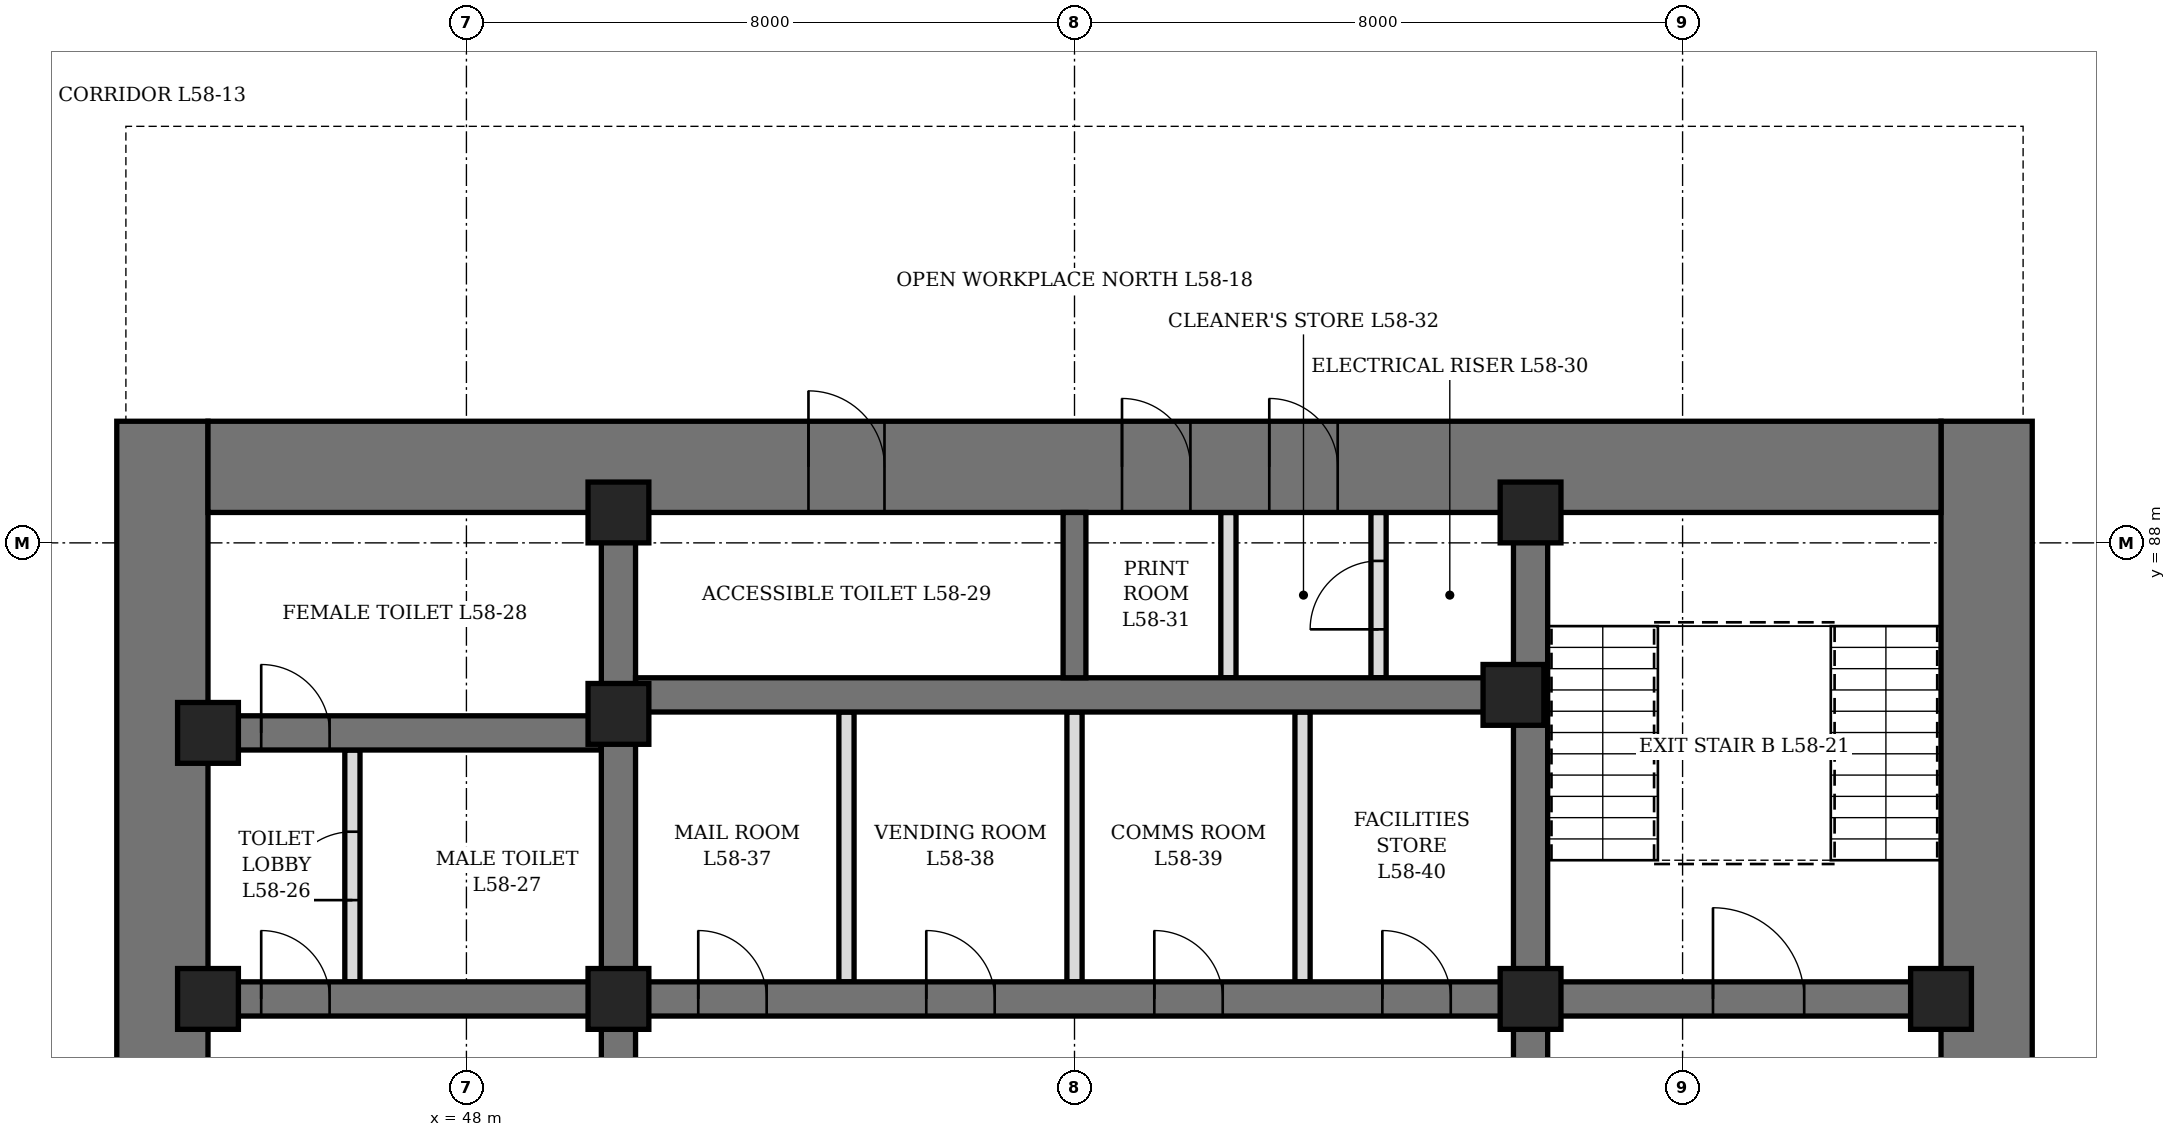
"""IFC4 building model, lengths in metres.
Left out: names, types, materials, properties, quantities, classifications, styles, units other than length and angle.
Written with IfcOpenShell. Run it as: python <this file> out.ifc"""

import sys

from ifc_helpers import new_model, si_unit, direction, frame, frame_2d, origin, origin_2d, place, context, subcontext, project, spatial, rectangle, hollow_rectangle, extrude, element, fill, save


model = new_model("IFC4")
c1 = context("Model", 3, precision=1e-05, world=origin(), true_north=direction((0.0, 1.0)))
c2 = subcontext(c1, "Body", "Model", "MODEL_VIEW")
j1 = project(units=[si_unit("LENGTHUNIT", "METRE"), si_unit("PLANEANGLEUNIT", "RADIAN")], contexts=[c1])
p1 = place(None, origin())
s1 = spatial("IfcSite", under=j1, at=p1, CompositionType="ELEMENT")
p2 = place(p1, origin())
s2 = spatial("IfcBuilding", under=s1, at=p2, CompositionType="ELEMENT")
p3 = place(p2, frame((0.0, 0.0, 258.7)))
s3 = spatial("IfcBuildingStorey", under=s2, at=p3, CompositionType="ELEMENT", Elevation=258.7)
p4 = place(p3, frame((44.0, 70.4, 0.0), z_axis=(0.0, 0.0, 1.0), x_axis=(0.0, 1.0, 0.0)))
e1 = element("IfcWall", 1, at=p4, inside=s3, PredefinedType="SHEAR", context=c2, shape_type="SweptSolid", body=[
    extrude(rectangle(XDim=19.2, YDim=1.2, at=frame_2d((9.6, 0.0))), origin(), (0.0, 0.0, 1.0), 4.2),
])
p5 = place(p4, frame((8.6, 0.0, 0.0)))
e2 = element("IfcOpeningElement", 2, at=p5, cuts=e1, PredefinedType="OPENING", context=c2, shape_type="SweptSolid", body=[
    extrude(rectangle(XDim=2.0, YDim=2.4, at=frame_2d((1.0, 1.2))), frame((0.0, 0.61, 0.0), z_axis=(0.0, -1.0, 0.0), x_axis=(1.0, 0.0, 0.0)), (0.0, 0.0, 1.0), 1.22),
])
p6 = place(p3, frame((68.0, 70.4, 0.0), z_axis=(0.0, 0.0, 1.0), x_axis=(0.0, 1.0, 0.0)))
e3 = element("IfcWall", 3, at=p6, inside=s3, PredefinedType="SHEAR", context=c2, shape_type="SweptSolid", body=[
    extrude(rectangle(XDim=19.2, YDim=1.2, at=frame_2d((9.6, 0.0))), origin(), (0.0, 0.0, 1.0), 4.2),
])
p7 = place(p6, frame((8.6, 0.0, 0.0)))
e4 = element("IfcOpeningElement", 4, at=p7, cuts=e3, PredefinedType="OPENING", context=c2, shape_type="SweptSolid", body=[
    extrude(rectangle(XDim=2.0, YDim=2.4, at=frame_2d((1.0, 1.2))), frame((0.0, 0.61, 0.0), z_axis=(0.0, -1.0, 0.0), x_axis=(1.0, 0.0, 0.0)), (0.0, 0.0, 1.0), 1.22),
])
p8 = place(p3, frame((44.6, 89.0, 0.0), z_axis=(0.0, 0.0, 1.0), x_axis=(1.0, 0.0, 0.0)))
e5 = element("IfcWall", 5, at=p8, inside=s3, PredefinedType="SHEAR", context=c2, shape_type="SweptSolid", body=[
    extrude(rectangle(XDim=22.8, YDim=1.2, at=frame_2d((11.4, 0.0))), origin(), (0.0, 0.0, 1.0), 4.2),
])
p9 = place(p8, frame((7.9, 0.0, 0.0)))
e6 = element("IfcOpeningElement", 6, at=p9, cuts=e5, PredefinedType="OPENING", context=c2, shape_type="SweptSolid", body=[
    extrude(rectangle(XDim=1.0, YDim=2.1, at=frame_2d((0.5, 1.05))), frame((0.0, 0.61, 0.0), z_axis=(0.0, -1.0, 0.0), x_axis=(1.0, 0.0, 0.0)), (0.0, 0.0, 1.0), 1.22),
])
p10 = place(p8, frame((12.025, 0.0, 0.0)))
e7 = element("IfcOpeningElement", 7, at=p10, cuts=e5, PredefinedType="OPENING", context=c2, shape_type="SweptSolid", body=[
    extrude(rectangle(XDim=0.9, YDim=2.1, at=frame_2d((0.45, 1.05))), frame((0.0, 0.61, 0.0), z_axis=(0.0, -1.0, 0.0), x_axis=(1.0, 0.0, 0.0)), (0.0, 0.0, 1.0), 1.22),
])
p11 = place(p8, frame((13.962, 0.0, 0.0)))
e8 = element("IfcOpeningElement", 8, at=p11, cuts=e5, PredefinedType="OPENING", context=c2, shape_type="SweptSolid", body=[
    extrude(rectangle(XDim=0.9, YDim=2.1, at=frame_2d((0.45, 1.05))), frame((0.0, 0.61, 0.0), z_axis=(0.0, -1.0, 0.0), x_axis=(1.0, 0.0, 0.0)), (0.0, 0.0, 1.0), 1.22),
])
p12 = place(p3, frame((50.0, 71.6, 0.0), z_axis=(0.0, 0.0, 1.0), x_axis=(0.0, 1.0, 0.0)))
e9 = element("IfcWall", 9, at=p12, inside=s3, PredefinedType="SHEAR", context=c2, shape_type="SweptSolid", body=[
    extrude(rectangle(XDim=16.8, YDim=0.45, at=frame_2d((8.4, 0.0))), origin(), (0.0, 0.0, 1.0), 4.2),
])
p13 = place(p12, frame((7.5, 0.0, 0.0)))
e10 = element("IfcOpeningElement", 10, at=p13, cuts=e9, PredefinedType="OPENING", context=c2, shape_type="SweptSolid", body=[
    extrude(rectangle(XDim=1.8, YDim=2.4, at=frame_2d((0.9, 1.2))), frame((0.0, 0.235, 0.0), z_axis=(0.0, -1.0, 0.0), x_axis=(1.0, 0.0, 0.0)), (0.0, 0.0, 1.0), 0.47),
])
p14 = place(p3, frame((62.0, 71.6, 0.0), z_axis=(0.0, 0.0, 1.0), x_axis=(0.0, 1.0, 0.0)))
e11 = element("IfcWall", 11, at=p14, inside=s3, PredefinedType="SHEAR", context=c2, shape_type="SweptSolid", body=[
    extrude(rectangle(XDim=16.8, YDim=0.45, at=frame_2d((8.4, 0.0))), origin(), (0.0, 0.0, 1.0), 4.2),
])
p15 = place(p14, frame((7.5, 0.0, 0.0)))
e12 = element("IfcOpeningElement", 12, at=p15, cuts=e11, PredefinedType="OPENING", context=c2, shape_type="SweptSolid", body=[
    extrude(rectangle(XDim=1.8, YDim=2.4, at=frame_2d((0.9, 1.2))), frame((0.0, 0.235, 0.0), z_axis=(0.0, -1.0, 0.0), x_axis=(1.0, 0.0, 0.0)), (0.0, 0.0, 1.0), 0.47),
])
p16 = place(p3, frame((44.6, 82.0, 0.0), z_axis=(0.0, 0.0, 1.0), x_axis=(1.0, 0.0, 0.0)))
e13 = element("IfcWall", 13, at=p16, inside=s3, PredefinedType="SHEAR", context=c2, shape_type="SweptSolid", body=[
    extrude(rectangle(XDim=5.175, YDim=0.45, at=frame_2d((2.587, 0.0))), origin(), (0.0, 0.0, 1.0), 4.2),
])
p17 = place(p16, frame((0.7, 0.0, 0.0)))
e14 = element("IfcOpeningElement", 14, at=p17, cuts=e13, PredefinedType="OPENING", context=c2, shape_type="SweptSolid", body=[
    extrude(rectangle(XDim=0.9, YDim=2.1, at=frame_2d((0.45, 1.05))), frame((0.0, 0.235, 0.0), z_axis=(0.0, -1.0, 0.0), x_axis=(1.0, 0.0, 0.0)), (0.0, 0.0, 1.0), 0.47),
])
p18 = place(p3, frame((44.6, 85.5, 0.0), z_axis=(0.0, 0.0, 1.0), x_axis=(1.0, 0.0, 0.0)))
e15 = element("IfcWall", 15, at=p18, inside=s3, PredefinedType="SHEAR", context=c2, shape_type="SweptSolid", body=[
    extrude(rectangle(XDim=5.175, YDim=0.45, at=frame_2d((2.587, 0.0))), origin(), (0.0, 0.0, 1.0), 4.2),
])
p19 = place(p18, frame((0.7, 0.0, 0.0)))
e16 = element("IfcOpeningElement", 16, at=p19, cuts=e15, PredefinedType="OPENING", context=c2, shape_type="SweptSolid", body=[
    extrude(rectangle(XDim=0.9, YDim=2.1, at=frame_2d((0.45, 1.05))), frame((0.0, 0.235, 0.0), z_axis=(0.0, -1.0, 0.0), x_axis=(1.0, 0.0, 0.0)), (0.0, 0.0, 1.0), 0.47),
])
p20 = place(p3, frame((62.225, 82.0, 0.0), z_axis=(0.0, 0.0, 1.0), x_axis=(1.0, 0.0, 0.0)))
e17 = element("IfcWall", 17, at=p20, inside=s3, PredefinedType="SHEAR", context=c2, shape_type="SweptSolid", body=[
    extrude(rectangle(XDim=5.175, YDim=0.45, at=frame_2d((2.587, 0.0))), origin(), (0.0, 0.0, 1.0), 4.2),
])
p21 = place(p20, frame((2.175, 0.0, 0.0)))
e18 = element("IfcOpeningElement", 18, at=p21, cuts=e17, PredefinedType="OPENING", context=c2, shape_type="SweptSolid", body=[
    extrude(rectangle(XDim=1.2, YDim=2.1, at=frame_2d((0.6, 1.05))), frame((0.0, 0.235, 0.0), z_axis=(0.0, -1.0, 0.0), x_axis=(1.0, 0.0, 0.0)), (0.0, 0.0, 1.0), 0.47),
])
p22 = place(p3, frame((50.225, 82.0, 0.0), z_axis=(0.0, 0.0, 1.0), x_axis=(1.0, 0.0, 0.0)))
e19 = element("IfcWall", 19, at=p22, inside=s3, PredefinedType="SHEAR", context=c2, shape_type="SweptSolid", body=[
    extrude(rectangle(XDim=11.55, YDim=0.45, at=frame_2d((5.775, 0.0))), origin(), (0.0, 0.0, 1.0), 4.2),
])
p23 = place(p22, frame((0.825, 0.0, 0.0)))
e20 = element("IfcOpeningElement", 20, at=p23, cuts=e19, PredefinedType="OPENING", context=c2, shape_type="SweptSolid", body=[
    extrude(rectangle(XDim=0.9, YDim=2.1, at=frame_2d((0.45, 1.05))), frame((0.0, 0.235, 0.0), z_axis=(0.0, -1.0, 0.0), x_axis=(1.0, 0.0, 0.0)), (0.0, 0.0, 1.0), 0.47),
])
p24 = place(p22, frame((3.825, 0.0, 0.0)))
e21 = element("IfcOpeningElement", 21, at=p24, cuts=e19, PredefinedType="OPENING", context=c2, shape_type="SweptSolid", body=[
    extrude(rectangle(XDim=0.9, YDim=2.1, at=frame_2d((0.45, 1.05))), frame((0.0, 0.235, 0.0), z_axis=(0.0, -1.0, 0.0), x_axis=(1.0, 0.0, 0.0)), (0.0, 0.0, 1.0), 0.47),
])
p25 = place(p22, frame((6.825, 0.0, 0.0)))
e22 = element("IfcOpeningElement", 22, at=p25, cuts=e19, PredefinedType="OPENING", context=c2, shape_type="SweptSolid", body=[
    extrude(rectangle(XDim=0.9, YDim=2.1, at=frame_2d((0.45, 1.05))), frame((0.0, 0.235, 0.0), z_axis=(0.0, -1.0, 0.0), x_axis=(1.0, 0.0, 0.0)), (0.0, 0.0, 1.0), 0.47),
])
p26 = place(p22, frame((9.825, 0.0, 0.0)))
e23 = element("IfcOpeningElement", 23, at=p26, cuts=e19, PredefinedType="OPENING", context=c2, shape_type="SweptSolid", body=[
    extrude(rectangle(XDim=0.9, YDim=2.1, at=frame_2d((0.45, 1.05))), frame((0.0, 0.235, 0.0), z_axis=(0.0, -1.0, 0.0), x_axis=(1.0, 0.0, 0.0)), (0.0, 0.0, 1.0), 0.47),
])
p27 = place(p3, frame((50.225, 86.0, 0.0), z_axis=(0.0, 0.0, 1.0), x_axis=(1.0, 0.0, 0.0)))
e24 = element("IfcWall", 24, at=p27, inside=s3, PredefinedType="SHEAR", context=c2, shape_type="SweptSolid", body=[
    extrude(rectangle(XDim=11.55, YDim=0.45, at=frame_2d((5.775, 0.0))), origin(), (0.0, 0.0, 1.0), 4.2),
])
p28 = place(p3, frame((56.0, 86.225, 0.0), z_axis=(0.0, 0.0, 1.0), x_axis=(0.0, 1.0, 0.0)))
e25 = element("IfcWall", 25, at=p28, inside=s3, PredefinedType="SHEAR", context=c2, shape_type="SweptSolid", body=[
    extrude(rectangle(XDim=2.175, YDim=0.3, at=frame_2d((1.087, 0.0))), origin(), (0.0, 0.0, 1.0), 4.2),
])
for number, where, z_axis, x_axis in (
    (26, (44.6, 82.0, 0.0), (0.0, 0.0, 1.0), (1.0, 0.0, 0.0)),
    (27, (44.6, 85.5, 0.0), (0.0, 0.0, 1.0), (1.0, 0.0, 0.0)),
    (28, (50.0, 82.0, 0.0), (0.0, 0.0, 1.0), (1.0, 0.0, 0.0)),
    (29, (50.0, 85.75, 0.0), (0.0, 0.0, 1.0), (1.0, 0.0, 0.0)),
    (30, (50.0, 88.4, 0.0), (0.0, 0.0, 1.0), (1.0, 0.0, 0.0)),
    (31, (61.775, 86.0, 0.0), (0.0, 0.0, 1.0), (1.0, 0.0, 0.0)),
    (32, (62.0, 82.0, 0.0), (0.0, 0.0, 1.0), (1.0, 0.0, 0.0)),
    (33, (62.0, 88.4, 0.0), (0.0, 0.0, 1.0), (1.0, 0.0, 0.0)),
    (34, (67.4, 82.0, 0.0), (0.0, 0.0, 1.0), (1.0, 0.0, 0.0)),
):
    element("IfcColumn", number, at=place(p3, frame(where, z_axis=z_axis, x_axis=x_axis)), inside=s3, PredefinedType="COLUMN", context=c2, shape_type="SweptSolid", body=[
        extrude(hollow_rectangle(XDim=0.8, YDim=0.8, WallThickness=0.1, at=origin_2d()), origin(), (0.0, 0.0, 1.0), 4.2),
    ])
p29 = place(p3, frame((46.5, 82.225, 0.0), z_axis=(0.0, 0.0, 1.0), x_axis=(0.0, 1.0, 0.0)))
e35 = element("IfcWall", 35, at=p29, inside=s3, PredefinedType="PARTITIONING", context=c2, shape_type="SweptSolid", body=[
    extrude(rectangle(XDim=3.05, YDim=0.2, at=frame_2d((1.525, 0.0))), origin(), (0.0, 0.0, 1.0), 4.04),
])
p30 = place(p29, frame((1.075, 0.0, 0.0)))
e36 = element("IfcOpeningElement", 36, at=p30, cuts=e35, PredefinedType="OPENING", context=c2, shape_type="SweptSolid", body=[
    extrude(rectangle(XDim=0.9, YDim=2.1, at=frame_2d((0.45, 1.05))), frame((0.0, 0.11, 0.0), z_axis=(0.0, -1.0, 0.0), x_axis=(1.0, 0.0, 0.0)), (0.0, 0.0, 1.0), 0.22),
])
p31 = place(p3, frame((60.0, 86.225, 0.0), z_axis=(0.0, 0.0, 1.0), x_axis=(0.0, 1.0, 0.0)))
e37 = element("IfcWall", 37, at=p31, inside=s3, PredefinedType="PARTITIONING", context=c2, shape_type="SweptSolid", body=[
    extrude(rectangle(XDim=2.175, YDim=0.2, at=frame_2d((1.087, 0.0))), origin(), (0.0, 0.0, 1.0), 4.04),
])
p32 = place(p31, frame((0.637, 0.0, 0.0)))
e38 = element("IfcOpeningElement", 38, at=p32, cuts=e37, PredefinedType="OPENING", context=c2, shape_type="SweptSolid", body=[
    extrude(rectangle(XDim=0.9, YDim=2.1, at=frame_2d((0.45, 1.05))), frame((0.0, 0.11, 0.0), z_axis=(0.0, -1.0, 0.0), x_axis=(1.0, 0.0, 0.0)), (0.0, 0.0, 1.0), 0.22),
])
p33 = place(p3, frame((58.025, 86.225, 0.0), z_axis=(0.0, 0.0, 1.0), x_axis=(0.0, 1.0, 0.0)))
e39 = element("IfcWall", 39, at=p33, inside=s3, PredefinedType="PARTITIONING", context=c2, shape_type="SweptSolid", body=[
    extrude(rectangle(XDim=2.175, YDim=0.2, at=frame_2d((1.087, 0.0))), origin(), (0.0, 0.0, 1.0), 4.04),
])
p34 = place(p3, frame((53.0, 82.225, 0.0), z_axis=(0.0, 0.0, 1.0), x_axis=(0.0, 1.0, 0.0)))
e40 = element("IfcWall", 40, at=p34, inside=s3, PredefinedType="PARTITIONING", context=c2, shape_type="SweptSolid", body=[
    extrude(rectangle(XDim=3.55, YDim=0.2, at=frame_2d((1.775, 0.0))), origin(), (0.0, 0.0, 1.0), 4.04),
])
p35 = place(p3, frame((56.0, 82.225, 0.0), z_axis=(0.0, 0.0, 1.0), x_axis=(0.0, 1.0, 0.0)))
e41 = element("IfcWall", 41, at=p35, inside=s3, PredefinedType="PARTITIONING", context=c2, shape_type="SweptSolid", body=[
    extrude(rectangle(XDim=3.55, YDim=0.2, at=frame_2d((1.775, 0.0))), origin(), (0.0, 0.0, 1.0), 3.14),
])
p36 = place(p3, frame((59.0, 82.225, 0.0), z_axis=(0.0, 0.0, 1.0), x_axis=(0.0, 1.0, 0.0)))
e42 = element("IfcWall", 42, at=p36, inside=s3, PredefinedType="PARTITIONING", context=c2, shape_type="SweptSolid", body=[
    extrude(rectangle(XDim=3.55, YDim=0.2, at=frame_2d((1.775, 0.0))), origin(), (0.0, 0.0, 1.0), 4.04),
])
p37 = place(p17, origin())
e43 = element("IfcDoor", 43, at=p37, inside=s3, OperationType="SINGLE_SWING_LEFT", PredefinedType="DOOR", context=c2, shape_type="SweptSolid", body=[
    extrude(rectangle(XDim=0.9, YDim=2.1, at=frame_2d((0.45, 1.05))), frame((0.0, 0.225, 0.0), z_axis=(0.0, -1.0, 0.0), x_axis=(1.0, 0.0, 0.0)), (0.0, 0.0, 1.0), 0.449),
])
fill(e14, e43)
p38 = place(p30, origin())
e44 = element("IfcDoor", 44, at=p38, inside=s3, OperationType="SINGLE_SWING_RIGHT", PredefinedType="DOOR", context=c2, shape_type="SweptSolid", body=[
    extrude(rectangle(XDim=0.9, YDim=2.1, at=frame_2d((0.45, 1.05))), frame((0.0, 0.1, 0.0), z_axis=(0.0, -1.0, 0.0), x_axis=(1.0, 0.0, 0.0)), (0.0, 0.0, 1.0), 0.199),
])
fill(e36, e44)
p39 = place(p19, origin())
e45 = element("IfcDoor", 45, at=p39, inside=s3, OperationType="SINGLE_SWING_RIGHT", PredefinedType="DOOR", context=c2, shape_type="SweptSolid", body=[
    extrude(rectangle(XDim=0.9, YDim=2.1, at=frame_2d((0.45, 1.05))), frame((0.0, 0.225, 0.0), z_axis=(0.0, -1.0, 0.0), x_axis=(1.0, 0.0, 0.0)), (0.0, 0.0, 1.0), 0.449),
])
fill(e16, e45)
p40 = place(p9, origin())
e46 = element("IfcDoor", 46, at=p40, inside=s3, OperationType="SINGLE_SWING_LEFT", PredefinedType="DOOR", context=c2, shape_type="SweptSolid", body=[
    extrude(rectangle(XDim=1.0, YDim=2.1, at=frame_2d((0.5, 1.05))), frame((0.0, 0.35, 0.0), z_axis=(0.0, -1.0, 0.0), x_axis=(1.0, 0.0, 0.0)), (0.0, 0.0, 1.0), 0.7),
])
fill(e6, e46)
p41 = place(p10, origin())
e47 = element("IfcDoor", 47, at=p41, inside=s3, OperationType="SINGLE_SWING_LEFT", PredefinedType="DOOR", context=c2, shape_type="SweptSolid", body=[
    extrude(rectangle(XDim=0.9, YDim=2.1, at=frame_2d((0.45, 1.05))), frame((0.0, 0.35, 0.0), z_axis=(0.0, -1.0, 0.0), x_axis=(1.0, 0.0, 0.0)), (0.0, 0.0, 1.0), 0.7),
])
fill(e7, e47)
p42 = place(p11, origin())
e48 = element("IfcDoor", 48, at=p42, inside=s3, OperationType="SINGLE_SWING_LEFT", PredefinedType="DOOR", context=c2, shape_type="SweptSolid", body=[
    extrude(rectangle(XDim=0.9, YDim=2.1, at=frame_2d((0.45, 1.05))), frame((0.0, 0.35, 0.0), z_axis=(0.0, -1.0, 0.0), x_axis=(1.0, 0.0, 0.0)), (0.0, 0.0, 1.0), 0.7),
])
fill(e8, e48)
p43 = place(p32, origin())
e49 = element("IfcDoor", 49, at=p43, inside=s3, OperationType="SINGLE_SWING_LEFT", PredefinedType="DOOR", context=c2, shape_type="SweptSolid", body=[
    extrude(rectangle(XDim=0.9, YDim=2.1, at=frame_2d((0.45, 1.05))), frame((0.0, 0.1, 0.0), z_axis=(0.0, -1.0, 0.0), x_axis=(1.0, 0.0, 0.0)), (0.0, 0.0, 1.0), 0.199),
])
fill(e38, e49)
p44 = place(p23, origin())
e50 = element("IfcDoor", 50, at=p44, inside=s3, OperationType="SINGLE_SWING_LEFT", PredefinedType="DOOR", context=c2, shape_type="SweptSolid", body=[
    extrude(rectangle(XDim=0.9, YDim=2.1, at=frame_2d((0.45, 1.05))), frame((0.0, 0.225, 0.0), z_axis=(0.0, -1.0, 0.0), x_axis=(1.0, 0.0, 0.0)), (0.0, 0.0, 1.0), 0.449),
])
fill(e20, e50)
p45 = place(p24, origin())
e51 = element("IfcDoor", 51, at=p45, inside=s3, OperationType="SINGLE_SWING_LEFT", PredefinedType="DOOR", context=c2, shape_type="SweptSolid", body=[
    extrude(rectangle(XDim=0.9, YDim=2.1, at=frame_2d((0.45, 1.05))), frame((0.0, 0.225, 0.0), z_axis=(0.0, -1.0, 0.0), x_axis=(1.0, 0.0, 0.0)), (0.0, 0.0, 1.0), 0.449),
])
fill(e21, e51)
p46 = place(p25, origin())
e52 = element("IfcDoor", 52, at=p46, inside=s3, OperationType="SINGLE_SWING_LEFT", PredefinedType="DOOR", context=c2, shape_type="SweptSolid", body=[
    extrude(rectangle(XDim=0.9, YDim=2.1, at=frame_2d((0.45, 1.05))), frame((0.0, 0.225, 0.0), z_axis=(0.0, -1.0, 0.0), x_axis=(1.0, 0.0, 0.0)), (0.0, 0.0, 1.0), 0.449),
])
fill(e22, e52)
p47 = place(p26, origin())
e53 = element("IfcDoor", 53, at=p47, inside=s3, OperationType="SINGLE_SWING_LEFT", PredefinedType="DOOR", context=c2, shape_type="SweptSolid", body=[
    extrude(rectangle(XDim=0.9, YDim=2.1, at=frame_2d((0.45, 1.05))), frame((0.0, 0.225, 0.0), z_axis=(0.0, -1.0, 0.0), x_axis=(1.0, 0.0, 0.0)), (0.0, 0.0, 1.0), 0.449),
])
fill(e23, e53)
p48 = place(p21, origin())
e54 = element("IfcDoor", 54, at=p48, inside=s3, OperationType="SINGLE_SWING_LEFT", PredefinedType="DOOR", context=c2, shape_type="SweptSolid", body=[
    extrude(rectangle(XDim=1.2, YDim=2.1, at=frame_2d((0.6, 1.05))), frame((0.0, 0.225, 0.0), z_axis=(0.0, -1.0, 0.0), x_axis=(1.0, 0.0, 0.0)), (0.0, 0.0, 1.0), 0.449),
])
fill(e18, e54)
save(model, sys.argv[1])
